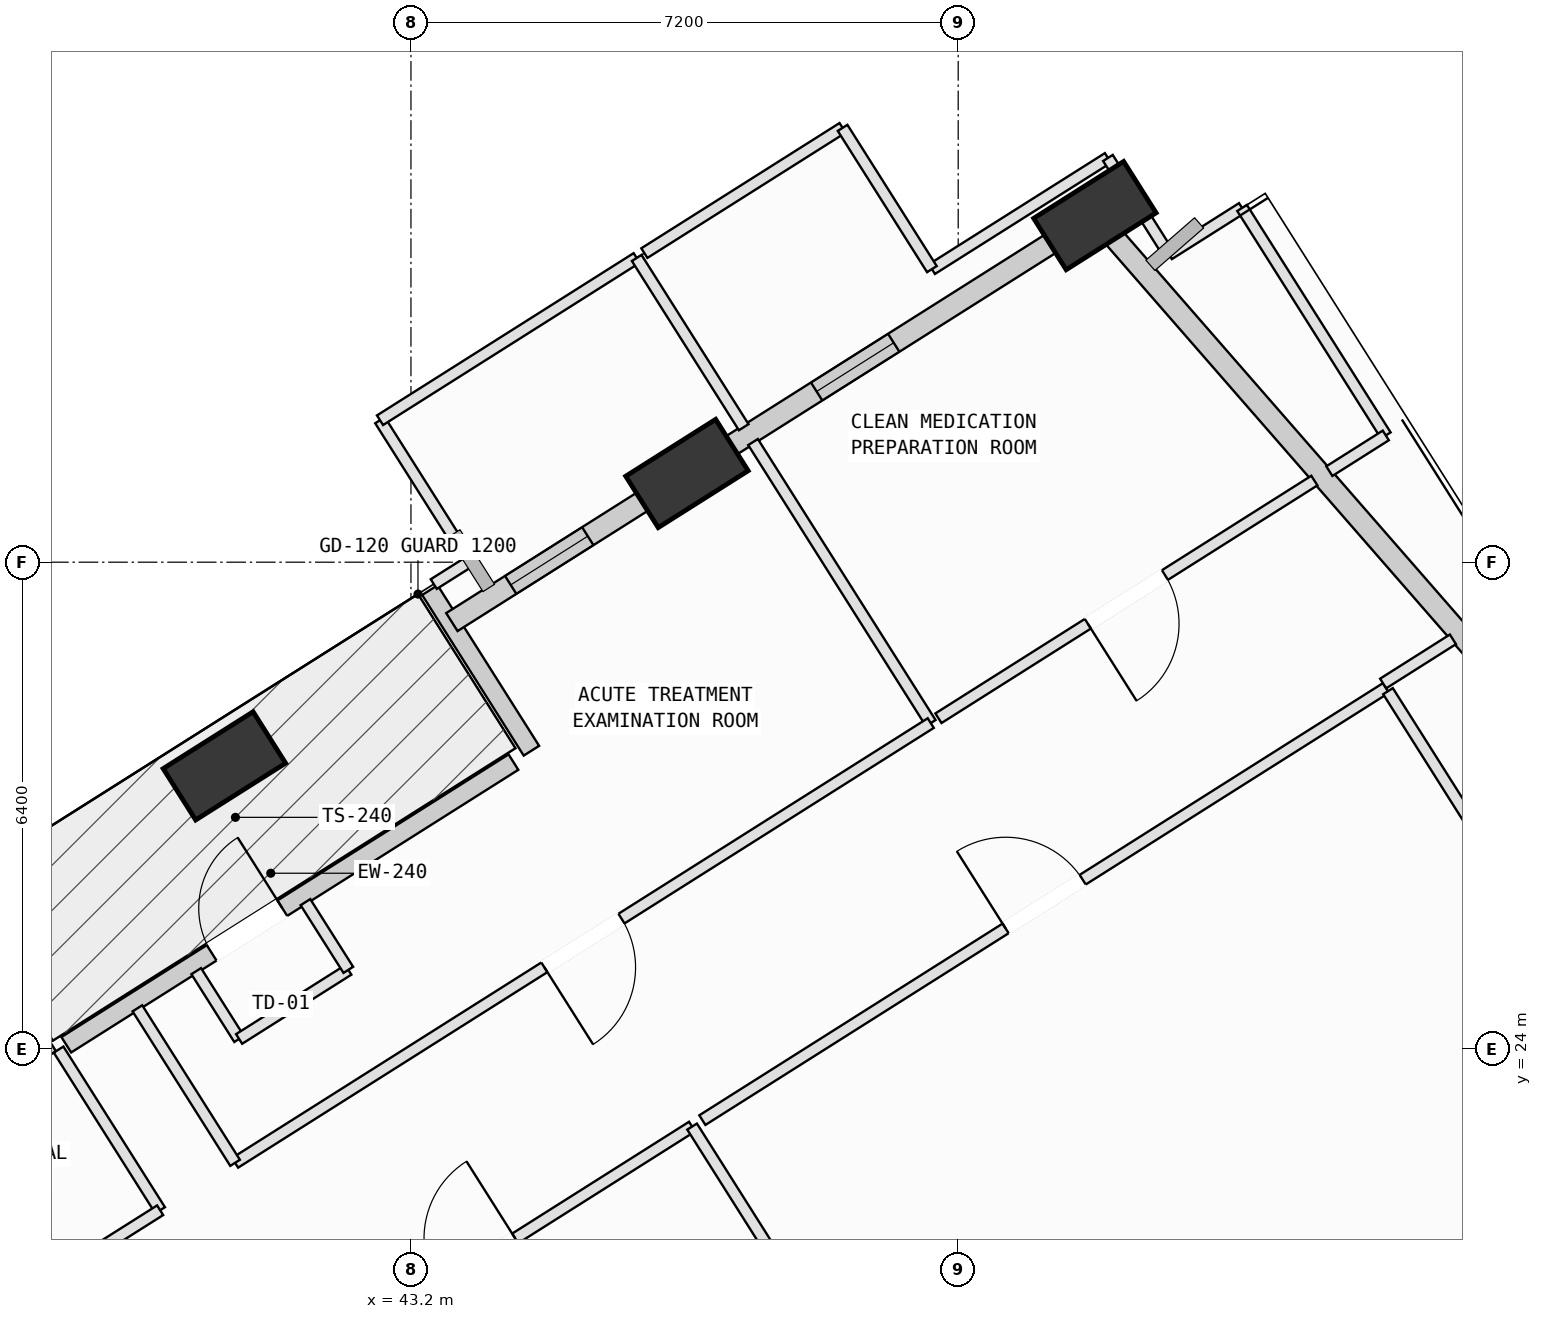
"""IFC4 building model, lengths in metres.
Left out: names, types, materials, properties, quantities, classifications, styles, units other than length and angle.
Written with IfcOpenShell. Run it as: python <this file> out.ifc"""

import sys

from ifc_helpers import new_model, si_unit, direction, frame, frame_2d, origin, origin_2d, place, context, subcontext, project, spatial, rectangle, extrude, element, fill, save


model = new_model("IFC4")
c1 = context("Model", 3, precision=1e-05, world=origin(), true_north=direction((0.0, 1.0)))
c2 = subcontext(c1, "Body", "Model", "MODEL_VIEW")
j1 = project(units=[si_unit("LENGTHUNIT", "METRE"), si_unit("PLANEANGLEUNIT", "RADIAN")], contexts=[c1])
p1 = place(None, origin())
s1 = spatial("IfcSite", under=j1, at=p1, CompositionType="ELEMENT")
p2 = place(p1, origin())
s2 = spatial("IfcBuilding", under=s1, at=p2, CompositionType="ELEMENT")
p3 = place(p2, frame((0.0, 0.0, 161.8)))
s3 = spatial("IfcBuildingStorey", under=s2, at=p3, CompositionType="ELEMENT", Elevation=161.8)
p4 = place(p3, frame((52.198, 34.961, 0.002), z_axis=(-0.042538974073, 0.076436268149, 0.996166618893), x_axis=(-0.479731001449, -0.876169648426, 0.046743057512)))
e1 = element("IfcColumn", 1, at=p4, inside=s3, PredefinedType="COLUMN", context=c2, shape_type="SweptSolid", body=[
    extrude(rectangle(XDim=1.4, YDim=0.8, at=origin_2d()), origin(), (0.0, 0.0, 1.0), 4.012),
])
p5 = place(p3, frame((46.831, 31.567, 0.002), z_axis=(-0.028475531093, 0.054512044533, 0.998106998838), x_axis=(-0.502261756691, -0.864090923747, 0.032863403107)))
e2 = element("IfcColumn", 2, at=p5, inside=s3, PredefinedType="COLUMN", context=c2, shape_type="SweptSolid", body=[
    extrude(rectangle(XDim=1.4, YDim=0.8, at=origin_2d()), origin(), (0.0, 0.0, 1.0), 4.004),
])
p6 = place(p3, frame((40.745, 27.72, 0.002), z_axis=(-0.012334092579, 0.029491914435, 0.999488917969), x_axis=(-0.573744273025, -0.818856350505, 0.017081756622)))
e3 = element("IfcColumn", 3, at=p6, inside=s3, PredefinedType="COLUMN", context=c2, shape_type="SweptSolid", body=[
    extrude(rectangle(XDim=1.4, YDim=0.8, at=origin_2d()), origin(), (0.0, 0.0, 1.0), 3.998),
])
p7 = place(p3, frame((38.665, 24.051, 0.0), z_axis=(0.0, 0.0, 1.0), x_axis=(0.84524375299, 0.534380948417, 0.0)))
e4 = element("IfcWall", 4, at=p7, inside=s3, PredefinedType="SOLIDWALL", context=c2, shape_type="SweptSolid", body=[
    extrude(rectangle(XDim=6.96, YDim=0.24, at=frame_2d((3.48, 0.0))), origin(), (0.0, 0.0, 1.0), 3.045),
])
p8 = place(p7, frame((2.263, 0.0, 0.0)))
e5 = element("IfcOpeningElement", 5, at=p8, cuts=e4, PredefinedType="OPENING", context=c2, shape_type="SweptSolid", body=[
    extrude(rectangle(XDim=1.1, YDim=2.15, at=frame_2d((0.55, 1.075))), frame((0.0, 0.13, 0.0), z_axis=(0.0, -1.0, 0.0), x_axis=(1.0, 0.0, 0.0)), (0.0, 0.0, 1.0), 0.26),
])
p9 = place(p3, frame((37.093, 26.014, 0.0), z_axis=(0.0, 0.0, 1.0), x_axis=(0.534345648323, -0.845266069423, 0.0)))
e6 = element("IfcWall", 6, at=p9, inside=s3, PredefinedType="SOLIDWALL", context=c2, shape_type="SweptSolid", body=[
    extrude(rectangle(XDim=2.5, YDim=0.24, at=frame_2d((1.25, 0.0))), origin(), (0.0, 0.0, 1.0), 3.165),
])
p10 = place(p3, frame((44.785, 27.919, 0.0), z_axis=(0.0, 0.0, 1.0), x_axis=(-0.53438975665, 0.845238184175, 0.0)))
e7 = element("IfcWall", 7, at=p10, inside=s3, PredefinedType="SOLIDWALL", context=c2, shape_type="SweptSolid", body=[
    extrude(rectangle(XDim=2.5, YDim=0.24, at=frame_2d((1.25, 0.0))), origin(), (0.0, 0.0, 1.0), 3.165),
])
p11 = place(p3, frame((52.411, 34.717, 0.0), z_axis=(0.0, 0.0, 1.0), x_axis=(0.657255929189, -0.753667462178, 0.0)))
e8 = element("IfcWall", 8, at=p11, inside=s3, PredefinedType="SOLIDWALL", context=c2, shape_type="SweptSolid", body=[
    extrude(rectangle(XDim=8.838, YDim=0.28, at=frame_2d((4.419, 0.0))), origin(), (0.0, 0.0, 1.0), 3.165),
])
p12 = place(p3, frame((47.246, 31.83, 0.0), z_axis=(0.0, 0.0, 1.0), x_axis=(0.845266635119, 0.534344753464, 0.0)))
e9 = element("IfcWall", 9, at=p12, inside=s3, PredefinedType="SOLIDWALL", context=c2, shape_type="SweptSolid", body=[
    extrude(rectangle(XDim=5.405, YDim=0.28, at=frame_2d((2.702, 0.0))), origin(), (0.0, 0.0, 1.0), 3.165),
])
p13 = place(p12, frame((1.528, 0.0, 0.75)))
e10 = element("IfcOpeningElement", 10, at=p13, cuts=e9, PredefinedType="OPENING", context=c2, shape_type="SweptSolid", body=[
    extrude(rectangle(XDim=1.2, YDim=1.75, at=frame_2d((0.6, 0.875))), frame((0.0, 0.15, 0.0), z_axis=(0.0, -1.0, 0.0), x_axis=(1.0, 0.0, 0.0)), (0.0, 0.0, 1.0), 0.3),
])
p14 = place(p3, frame((43.738, 29.612, 0.0), z_axis=(0.0, 0.0, 1.0), x_axis=(0.845268690178, 0.534341502604, 0.0)))
e11 = element("IfcWall", 11, at=p14, inside=s3, PredefinedType="SOLIDWALL", context=c2, shape_type="SweptSolid", body=[
    extrude(rectangle(XDim=3.189, YDim=0.28, at=frame_2d((1.594, 0.0))), origin(), (0.0, 0.0, 1.0), 3.045),
])
p15 = place(p14, frame((0.915, 0.0, 0.75)))
e12 = element("IfcOpeningElement", 12, at=p15, cuts=e11, PredefinedType="OPENING", context=c2, shape_type="SweptSolid", body=[
    extrude(rectangle(XDim=1.2, YDim=1.75, at=frame_2d((0.6, 0.875))), frame((0.0, 0.15, 0.0), z_axis=(0.0, -1.0, 0.0), x_axis=(1.0, 0.0, 0.0)), (0.0, 0.0, 1.0), 0.3),
])
p16 = place(p3, frame((41.23, 19.39, 0.0), z_axis=(0.0, 0.0, 1.0), x_axis=(0.845230176883, 0.534402421482, 0.0)))
e13 = element("IfcWall", 13, at=p16, inside=s3, PredefinedType="PARTITIONING", context=c2, shape_type="SweptSolid", body=[
    extrude(rectangle(XDim=6.707, YDim=0.15, at=frame_2d((3.354, 0.0))), origin(), (0.0, 0.0, 1.0), 3.065),
])
p17 = place(p16, frame((2.753, 0.0, 0.0)))
e14 = element("IfcOpeningElement", 14, at=p17, cuts=e13, PredefinedType="OPENING", context=c2, shape_type="SweptSolid", body=[
    extrude(rectangle(XDim=1.2, YDim=2.15, at=frame_2d((0.6, 1.075))), frame((0.0, 0.085, 0.0), z_axis=(0.0, -1.0, 0.0), x_axis=(1.0, 0.0, 0.0)), (0.0, 0.0, 1.0), 0.17),
])
p18 = place(p3, frame((46.899, 22.974, 0.0), z_axis=(0.0, 0.0, 1.0), x_axis=(0.534341679517, -0.845268578341, 0.0)))
e15 = element("IfcWall", 15, at=p18, inside=s3, PredefinedType="PARTITIONING", context=c2, shape_type="SweptSolid", body=[
    extrude(rectangle(XDim=13.486, YDim=0.15, at=frame_2d((6.743, 0.0))), origin(), (0.0, 0.0, 1.0), 3.415),
])
p19 = place(p3, frame((47.034, 23.059, 0.0), z_axis=(0.0, 0.0, 1.0), x_axis=(0.845254384561, 0.534364131825, 0.0)))
e16 = element("IfcWall", 16, at=p19, inside=s3, PredefinedType="PARTITIONING", context=c2, shape_type="SweptSolid", body=[
    extrude(rectangle(XDim=10.641, YDim=0.15, at=frame_2d((5.32, 0.0))), origin(), (0.0, 0.0, 1.0), 3.78),
])
p20 = place(p19, frame((4.72, 0.0, 0.0)))
e17 = element("IfcOpeningElement", 17, at=p20, cuts=e16, PredefinedType="OPENING", context=c2, shape_type="SweptSolid", body=[
    extrude(rectangle(XDim=1.2, YDim=2.15, at=frame_2d((0.6, 1.075))), frame((0.0, 0.085, 0.0), z_axis=(0.0, -1.0, 0.0), x_axis=(1.0, 0.0, 0.0)), (0.0, 0.0, 1.0), 0.17),
])
p21 = place(p3, frame((56.055, 28.703, 0.0), z_axis=(0.0, 0.0, 1.0), x_axis=(0.534282303531, -0.845306110314, 0.0)))
e18 = element("IfcWall", 18, at=p21, inside=s3, PredefinedType="PARTITIONING", context=c2, shape_type="SweptSolid", body=[
    extrude(rectangle(XDim=11.397, YDim=0.15, at=frame_2d((5.698, 0.0))), origin(), (0.0, 0.0, 1.0), 3.78),
])
p22 = place(p21, frame((5.269, 0.0, 0.0)))
e19 = element("IfcOpeningElement", 19, at=p22, cuts=e18, PredefinedType="OPENING", context=c2, shape_type="SweptSolid", body=[
    extrude(rectangle(XDim=0.86, YDim=2.06, at=frame_2d((0.43, 1.03))), frame((0.0, 0.085, 0.0), z_axis=(0.0, -1.0, 0.0), x_axis=(1.0, 0.0, 0.0)), (0.0, 0.0, 1.0), 0.17),
])
p23 = place(p3, frame((38.564, 23.987, 0.0), z_axis=(0.0, 0.0, 1.0), x_axis=(0.534213358296, -0.845349683751, 0.0)))
e20 = element("IfcWall", 20, at=p23, inside=s3, PredefinedType="PARTITIONING", context=c2, shape_type="SweptSolid", body=[
    extrude(rectangle(XDim=2.501, YDim=0.15, at=frame_2d((1.25, 0.0))), origin(), (0.0, 0.0, 1.0), 3.78),
])
p24 = place(p3, frame((39.9, 21.873, 0.0), z_axis=(0.0, 0.0, 1.0), x_axis=(-0.845340806847, -0.534227405025, 0.0)))
e21 = element("IfcWall", 21, at=p24, inside=s3, PredefinedType="PARTITIONING", context=c2, shape_type="SweptSolid", body=[
    extrude(rectangle(XDim=2.233, YDim=0.15, at=frame_2d((1.117, 0.0))), origin(), (0.0, 0.0, 1.0), 3.045),
])
p25 = place(p3, frame((43.969, 30.408, 0.0), z_axis=(0.0, 0.0, 1.0), x_axis=(-0.534389454456, 0.845238375233, 0.0)))
e22 = element("IfcWall", 22, at=p25, inside=s3, PredefinedType="PARTITIONING", context=c2, shape_type="SweptSolid", body=[
    extrude(rectangle(XDim=2.201, YDim=0.15, at=frame_2d((1.1, 0.0))), origin(), (0.0, 0.0, 1.0), 3.78),
])
p26 = place(p3, frame((42.793, 32.268, 0.0), z_axis=(0.0, 0.0, 1.0), x_axis=(0.845240509007, 0.534386079473, 0.0)))
e23 = element("IfcWall", 23, at=p26, inside=s3, PredefinedType="PARTITIONING", context=c2, shape_type="SweptSolid", body=[
    extrude(rectangle(XDim=3.995, YDim=0.15, at=frame_2d((1.998, 0.0))), origin(), (0.0, 0.0, 1.0), 3.78),
])
p27 = place(p3, frame((46.17, 34.403, 0.0), z_axis=(0.0, 0.0, 1.0), x_axis=(0.53437293713, -0.845248817842, 0.0)))
e24 = element("IfcWall", 24, at=p27, inside=s3, PredefinedType="PARTITIONING", context=c2, shape_type="SweptSolid", body=[
    extrude(rectangle(XDim=2.635, YDim=0.15, at=frame_2d((1.317, 0.0))), origin(), (0.0, 0.0, 1.0), 3.78),
])
p28 = place(p3, frame((47.701, 31.981, 0.0), z_axis=(0.0, 0.0, 1.0), x_axis=(0.534410719014, -0.845224930657, 0.0)))
e25 = element("IfcWall", 25, at=p28, inside=s3, PredefinedType="PARTITIONING", context=c2, shape_type="SweptSolid", body=[
    extrude(rectangle(XDim=4.375, YDim=0.15, at=frame_2d((2.188, 0.0))), origin(), (0.0, 0.0, 1.0), 3.78),
])
p29 = place(p3, frame((50.039, 28.283, 0.0), z_axis=(0.0, 0.0, 1.0), x_axis=(-0.845280431179, -0.534322929197, 0.0)))
e26 = element("IfcWall", 26, at=p29, inside=s3, PredefinedType="PARTITIONING", context=c2, shape_type="SweptSolid", body=[
    extrude(rectangle(XDim=10.828, YDim=0.15, at=frame_2d((5.414, 0.0))), origin(), (0.0, 0.0, 1.0), 3.78),
])
p30 = place(p29, frame((4.814, 0.0, 0.0)))
e27 = element("IfcOpeningElement", 27, at=p30, cuts=e26, PredefinedType="OPENING", context=c2, shape_type="SweptSolid", body=[
    extrude(rectangle(XDim=1.2, YDim=2.15, at=frame_2d((0.6, 1.075))), frame((0.0, 0.085, 0.0), z_axis=(0.0, -1.0, 0.0), x_axis=(1.0, 0.0, 0.0)), (0.0, 0.0, 1.0), 0.17),
])
p31 = place(p3, frame((40.886, 22.497, 0.0), z_axis=(0.0, 0.0, 1.0), x_axis=(-0.534271775948, 0.845312764263, 0.0)))
e28 = element("IfcWall", 28, at=p31, inside=s3, PredefinedType="PARTITIONING", context=c2, shape_type="SweptSolid", body=[
    extrude(rectangle(XDim=2.405, YDim=0.15, at=frame_2d((1.203, 0.0))), origin(), (0.0, 0.0, 1.0), 3.78),
])
p32 = place(p3, frame((40.375, 25.019, 0.0), z_axis=(0.0, 0.0, 1.0), x_axis=(0.534358479235, -0.845257958063, 0.0)))
e29 = element("IfcWall", 29, at=p32, inside=s3, PredefinedType="PARTITIONING", context=c2, shape_type="SweptSolid", body=[
    extrude(rectangle(XDim=1.055, YDim=0.15, at=frame_2d((0.528, 0.0))), origin(), (0.0, 0.0, 1.0), 3.78),
])
p33 = place(p3, frame((40.939, 24.127, 0.0), z_axis=(0.0, 0.0, 1.0), x_axis=(0.845130465674, 0.53456009577, 0.0)))
e30 = element("IfcWall", 30, at=p33, inside=s3, PredefinedType="PARTITIONING", context=c2, shape_type="SweptSolid", body=[
    extrude(rectangle(XDim=1.7, YDim=0.15, at=frame_2d((0.85, 0.0))), origin(), (0.0, 0.0, 1.0), 3.045),
])
p34 = place(p3, frame((42.376, 25.036, 0.0), z_axis=(0.0, 0.0, 1.0), x_axis=(-0.534776670064, 0.844993439711, 0.0)))
e31 = element("IfcWall", 31, at=p34, inside=s3, PredefinedType="PARTITIONING", context=c2, shape_type="SweptSolid", body=[
    extrude(rectangle(XDim=1.055, YDim=0.15, at=frame_2d((0.527, 0.0))), origin(), (0.0, 0.0, 1.0), 3.78),
])
p35 = place(p3, frame((43.5, 30.112, 0.0), z_axis=(0.0, 0.0, 1.0), x_axis=(0.845739888668, 0.533595390456, 0.0)))
e32 = element("IfcWall", 32, at=p35, inside=s3, PredefinedType="PARTITIONING", context=c2, shape_type="SweptSolid", body=[
    extrude(rectangle(XDim=0.554, YDim=0.15, at=frame_2d((0.277, 0.0))), origin(), (0.0, 0.0, 1.0), 3.145),
])
p36 = place(p3, frame((50.054, 34.256, 0.0), z_axis=(0.0, 0.0, 1.0), x_axis=(0.845480432123, 0.534006403424, 0.0)))
e33 = element("IfcWall", 33, at=p36, inside=s3, PredefinedType="PARTITIONING", context=c2, shape_type="SweptSolid", body=[
    extrude(rectangle(XDim=2.74, YDim=0.15, at=frame_2d((1.37, 0.0))), origin(), (0.0, 0.0, 1.0), 3.165),
])
p37 = place(p3, frame((52.37, 35.719, 0.0), z_axis=(0.0, 0.0, 1.0), x_axis=(0.533943992974, -0.845519847411, 0.0)))
e34 = element("IfcWall", 34, at=p37, inside=s3, PredefinedType="PARTITIONING", context=c2, shape_type="SweptSolid", body=[
    extrude(rectangle(XDim=1.5, YDim=0.15, at=frame_2d((0.75, 0.0))), origin(), (0.0, 0.0, 1.0), 3.165),
])
p38 = place(p3, frame((53.171, 34.451, 0.0), z_axis=(0.0, 0.0, 1.0), x_axis=(0.845015692046, 0.53474150783, 0.0)))
e35 = element("IfcWall", 35, at=p38, inside=s3, PredefinedType="PARTITIONING", context=c2, shape_type="SweptSolid", body=[
    extrude(rectangle(XDim=1.141, YDim=0.15, at=frame_2d((0.57, 0.0))), origin(), (0.0, 0.0, 1.0), 3.78),
])
p39 = place(p3, frame((54.135, 35.061, 0.0), z_axis=(0.0, 0.0, 1.0), x_axis=(0.534114933468, -0.845411874678, 0.0)))
e36 = element("IfcWall", 36, at=p39, inside=s3, PredefinedType="PARTITIONING", context=c2, shape_type="SweptSolid", body=[
    extrude(rectangle(XDim=3.54, YDim=0.15, at=frame_2d((1.77, 0.0))), origin(), (0.0, 0.0, 1.0), 3.78),
])
p40 = place(p3, frame((56.026, 32.068, 0.0), z_axis=(0.0, 0.0, 1.0), x_axis=(-0.844973843972, -0.534807631774, 0.0)))
e37 = element("IfcWall", 37, at=p40, inside=s3, PredefinedType="PARTITIONING", context=c2, shape_type="SweptSolid", body=[
    extrude(rectangle(XDim=0.879, YDim=0.15, at=frame_2d((0.439, 0.0))), origin(), (0.0, 0.0, 1.0), 3.78),
])
p41 = place(p3, frame((55.086, 31.474, 0.0), z_axis=(0.0, 0.0, 1.0), x_axis=(-0.845228065929, -0.534405760229, 0.0)))
e38 = element("IfcWall", 38, at=p41, inside=s3, PredefinedType="PARTITIONING", context=c2, shape_type="SweptSolid", body=[
    extrude(rectangle(XDim=5.852, YDim=0.15, at=frame_2d((2.926, 0.0))), origin(), (0.0, 0.0, 1.0), 3.78),
])
p42 = place(p41, frame((2.326, 0.0, 0.0)))
e39 = element("IfcOpeningElement", 39, at=p42, cuts=e38, PredefinedType="OPENING", context=c2, shape_type="SweptSolid", body=[
    extrude(rectangle(XDim=1.2, YDim=2.15, at=frame_2d((0.6, 1.075))), frame((0.0, 0.085, 0.0), z_axis=(0.0, -1.0, 0.0), x_axis=(1.0, 0.0, 0.0)), (0.0, 0.0, 1.0), 0.17),
])
p43 = place(p3, frame((46.271, 34.467, 0.0), z_axis=(0.0, 0.0, 1.0), x_axis=(0.845364764878, 0.534189492879, 0.0)))
e40 = element("IfcWall", 40, at=p43, inside=s3, PredefinedType="PARTITIONING", context=c2, shape_type="SweptSolid", body=[
    extrude(rectangle(XDim=3.085, YDim=0.15, at=frame_2d((1.542, 0.0))), origin(), (0.0, 0.0, 1.0), 3.78),
])
p44 = place(p3, frame((48.879, 36.115, 0.0), z_axis=(0.0, 0.0, 1.0), x_axis=(0.53432292285, -0.845280435191, 0.0)))
e41 = element("IfcWall", 41, at=p44, inside=s3, PredefinedType="PARTITIONING", context=c2, shape_type="SweptSolid", body=[
    extrude(rectangle(XDim=2.199, YDim=0.15, at=frame_2d((1.1, 0.0))), origin(), (0.0, 0.0, 1.0), 3.78),
])
p45 = place(p3, frame((55.991, 28.804, 0.0), z_axis=(0.0, 0.0, 1.0), x_axis=(0.844954487562, 0.534838212872, 0.0)))
e42 = element("IfcWall", 42, at=p45, inside=s3, PredefinedType="PARTITIONING", context=c2, shape_type="SweptSolid", body=[
    extrude(rectangle(XDim=1.086, YDim=0.15, at=frame_2d((0.543, 0.0))), origin(), (0.0, 0.0, 1.0), 3.78),
])
p46 = place(p8, origin())
e43 = element("IfcDoor", 43, at=p46, inside=s3, OperationType="SINGLE_SWING_RIGHT", PredefinedType="DOOR", context=c2, shape_type="SweptSolid", body=[
    extrude(rectangle(XDim=1.1, YDim=2.15, at=frame_2d((0.55, 1.075))), frame((0.0, 0.025, 0.0), z_axis=(0.0, -1.0, 0.0), x_axis=(1.0, 0.0, 0.0)), (0.0, 0.0, 1.0), 0.05),
])
fill(e5, e43)
p47 = place(p13, origin())
e44 = element("IfcWindow", 44, at=p47, inside=s3, PartitioningType="SINGLE_PANEL", PredefinedType="WINDOW", context=c2, shape_type="SweptSolid", body=[
    extrude(rectangle(XDim=1.2, YDim=1.75, at=frame_2d((0.6, 0.875))), frame((0.0, 0.03, 0.0), z_axis=(0.0, -1.0, 0.0), x_axis=(1.0, 0.0, 0.0)), (0.0, 0.0, 1.0), 0.06),
])
fill(e10, e44)
p48 = place(p15, origin())
e45 = element("IfcWindow", 45, at=p48, inside=s3, PartitioningType="SINGLE_PANEL", PredefinedType="WINDOW", context=c2, shape_type="SweptSolid", body=[
    extrude(rectangle(XDim=1.2, YDim=1.75, at=frame_2d((0.6, 0.875))), frame((0.0, 0.03, 0.0), z_axis=(0.0, -1.0, 0.0), x_axis=(1.0, 0.0, 0.0)), (0.0, 0.0, 1.0), 0.06),
])
fill(e12, e45)
p49 = place(p17, origin())
e46 = element("IfcDoor", 46, at=p49, inside=s3, OperationType="SINGLE_SWING_RIGHT", PredefinedType="DOOR", context=c2, shape_type="SweptSolid", body=[
    extrude(rectangle(XDim=1.2, YDim=2.15, at=frame_2d((0.6, 1.075))), frame((0.0, 0.025, 0.0), z_axis=(0.0, -1.0, 0.0), x_axis=(1.0, 0.0, 0.0)), (0.0, 0.0, 1.0), 0.05),
])
fill(e14, e46)
p50 = place(p20, origin())
e47 = element("IfcDoor", 47, at=p50, inside=s3, OperationType="SINGLE_SWING_LEFT", PredefinedType="DOOR", context=c2, shape_type="SweptSolid", body=[
    extrude(rectangle(XDim=1.2, YDim=2.15, at=frame_2d((0.6, 1.075))), frame((0.0, 0.025, 0.0), z_axis=(0.0, -1.0, 0.0), x_axis=(1.0, 0.0, 0.0)), (0.0, 0.0, 1.0), 0.05),
])
fill(e17, e47)
p51 = place(p30, origin())
e48 = element("IfcDoor", 48, at=p51, inside=s3, OperationType="SINGLE_SWING_RIGHT", PredefinedType="DOOR", context=c2, shape_type="SweptSolid", body=[
    extrude(rectangle(XDim=1.2, YDim=2.15, at=frame_2d((0.6, 1.075))), frame((0.0, 0.025, 0.0), z_axis=(0.0, -1.0, 0.0), x_axis=(1.0, 0.0, 0.0)), (0.0, 0.0, 1.0), 0.05),
])
fill(e27, e48)
p52 = place(p42, origin())
e49 = element("IfcDoor", 49, at=p52, inside=s3, OperationType="SINGLE_SWING_RIGHT", PredefinedType="DOOR", context=c2, shape_type="SweptSolid", body=[
    extrude(rectangle(XDim=1.2, YDim=2.15, at=frame_2d((0.6, 1.075))), frame((0.0, 0.025, 0.0), z_axis=(0.0, -1.0, 0.0), x_axis=(1.0, 0.0, 0.0)), (0.0, 0.0, 1.0), 0.05),
])
fill(e39, e49)
save(model, sys.argv[1])
